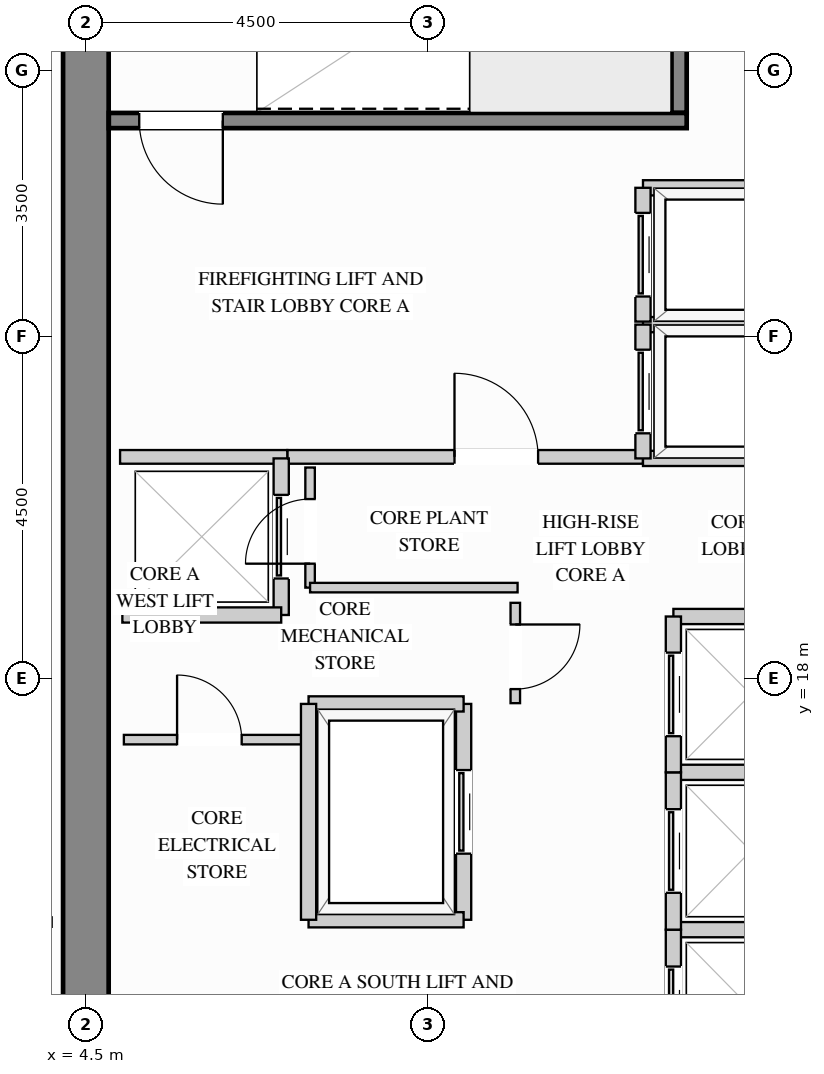
"""IFC4 building model, lengths in metres.
Left out: names, types, materials, properties, quantities, classifications, styles, units other than length and angle.
Written with IfcOpenShell. Run it as: python <this file> out.ifc"""

import sys

from ifc_helpers import new_model, si_unit, direction, frame, frame_2d, origin, place, context, subcontext, project, spatial, rectangle, extrude, source, transform, mapped, element, fill, save


model = new_model("IFC4")
c1 = context("Model", 3, precision=1e-05, world=origin(), true_north=direction((0.0, 1.0)))
c2 = subcontext(c1, "Body", "Model", "MODEL_VIEW")
j1 = project(units=[si_unit("LENGTHUNIT", "METRE"), si_unit("PLANEANGLEUNIT", "RADIAN")], contexts=[c1])
p1 = place(None, origin())
s1 = spatial("IfcSite", under=j1, at=p1, CompositionType="ELEMENT")
p2 = place(p1, origin())
s2 = spatial("IfcBuilding", under=s1, at=p2, CompositionType="ELEMENT")
p3 = place(p2, frame((0.0, 0.0, 164.7)))
s3 = spatial("IfcBuildingStorey", under=s2, at=p3, CompositionType="ELEMENT", Elevation=164.7)
m1 = source(origin(), c2, "Body", "SweptSolid", [
    extrude(rectangle(XDim=20.4, YDim=0.6, at=frame_2d((10.2, 0.0))), origin(), (0.0, 0.0, 1.0), 3.4),
])
p4 = place(p3, frame((4.5, 8.8, 0.0), z_axis=(0.0, 0.0, 1.0), x_axis=(0.0, 1.0, 0.0)))
e1 = element("IfcWall", 1, at=p4, inside=s3, PredefinedType="SHEAR", context=c2, shape_type="MappedRepresentation", body=[
    mapped(m1, transform((0.0, 0.0, 0.0), x_axis=(1.0, 0.0, 0.0), y_axis=(0.0, 1.0, 0.0), z_axis=(0.0, 0.0, 1.0))),
])
p5 = place(p3, frame((7.15, 20.92, 0.0), z_axis=(0.0, 0.0, 1.0), x_axis=(1.0, 0.0, 0.0)))
e2 = element("IfcWall", 2, at=p5, inside=s3, PredefinedType="PARTITIONING", context=c2, shape_type="SweptSolid", body=[
    extrude(rectangle(XDim=4.68, YDim=0.18, at=frame_2d((2.34, 0.0))), origin(), (0.0, 0.0, 1.0), 3.385),
])
p6 = place(p5, frame((2.2, 0.0, 0.0)))
e3 = element("IfcOpeningElement", 3, at=p6, cuts=e2, PredefinedType="OPENING", context=c2, shape_type="SweptSolid", body=[
    extrude(rectangle(XDim=1.1, YDim=2.15, at=frame_2d((0.55, 1.075))), frame((0.0, 0.1, 0.0), z_axis=(0.0, -1.0, 0.0), x_axis=(1.0, 0.0, 0.0)), (0.0, 0.0, 1.0), 0.2),
])
m2 = source(origin(), c2, "Body", "SweptSolid", [
    extrude(rectangle(XDim=2.2, YDim=0.18, at=frame_2d((1.1, 0.0))), origin(), (0.0, 0.0, 1.0), 3.385),
])
p7 = place(p3, frame((4.95, 20.92, 0.0), z_axis=(0.0, 0.0, 1.0), x_axis=(1.0, 0.0, 0.0)))
e4 = element("IfcWall", 4, at=p7, inside=s3, PredefinedType="PARTITIONING", context=c2, shape_type="MappedRepresentation", body=[
    mapped(m2, transform((0.0, 0.0, 0.0), x_axis=(1.0, 0.0, 0.0), y_axis=(0.0, 1.0, 0.0), z_axis=(0.0, 0.0, 1.0))),
])
p8 = place(p3, frame((10.15, 17.68, 0.0), z_axis=(0.0, 0.0, 1.0), x_axis=(0.0, 1.0, 0.0)))
e5 = element("IfcWall", 5, at=p8, inside=s3, PredefinedType="PARTITIONING", context=c2, shape_type="SweptSolid", body=[
    extrude(rectangle(XDim=1.32, YDim=0.125, at=frame_2d((0.66, 0.0))), origin(), (0.0, 0.0, 1.0), 3.385),
])
p9 = place(p8, frame((0.185, 0.0, 0.0)))
e6 = element("IfcOpeningElement", 6, at=p9, cuts=e5, PredefinedType="OPENING", context=c2, shape_type="SweptSolid", body=[
    extrude(rectangle(XDim=0.85, YDim=2.1, at=frame_2d((0.425, 1.05))), frame((0.0, 0.073, 0.0), z_axis=(0.0, -1.0, 0.0), x_axis=(1.0, 0.0, 0.0)), (0.0, 0.0, 1.0), 0.145),
])
p10 = place(p3, frame((7.45, 19.2, 0.0), z_axis=(0.0, 0.0, 1.0), x_axis=(0.0, 1.0, 0.0)))
e7 = element("IfcWall", 7, at=p10, inside=s3, PredefinedType="PARTITIONING", context=c2, shape_type="SweptSolid", body=[
    extrude(rectangle(XDim=1.58, YDim=0.125, at=frame_2d((0.79, 0.0))), origin(), (0.0, 0.0, 1.0), 3.385),
])
p11 = place(p10, frame((0.315, 0.0, 0.0)))
e8 = element("IfcOpeningElement", 8, at=p11, cuts=e7, PredefinedType="OPENING", context=c2, shape_type="SweptSolid", body=[
    extrude(rectangle(XDim=0.85, YDim=2.1, at=frame_2d((0.425, 1.05))), frame((0.0, 0.073, 0.0), z_axis=(0.0, -1.0, 0.0), x_axis=(1.0, 0.0, 0.0)), (0.0, 0.0, 1.0), 0.145),
])
m3 = source(origin(), c2, "Body", "SweptSolid", [
    extrude(rectangle(XDim=2.73, YDim=0.125, at=frame_2d((1.365, 0.0))), origin(), (0.0, 0.0, 1.0), 3.385),
])
p12 = place(p3, frame((7.45, 19.2, 0.0), z_axis=(0.0, 0.0, 1.0), x_axis=(1.0, 0.0, 0.0)))
e9 = element("IfcWall", 9, at=p12, inside=s3, PredefinedType="PARTITIONING", context=c2, shape_type="MappedRepresentation", body=[
    mapped(m3, transform((0.0, 0.0, 0.0), x_axis=(1.0, 0.0, 0.0), y_axis=(0.0, 1.0, 0.0), z_axis=(0.0, 0.0, 1.0))),
])
p13 = place(p3, frame((5.0, 17.2, 0.0), z_axis=(0.0, 0.0, 1.0), x_axis=(1.0, 0.0, 0.0)))
e10 = element("IfcWall", 10, at=p13, inside=s3, PredefinedType="PARTITIONING", context=c2, shape_type="SweptSolid", body=[
    extrude(rectangle(XDim=2.4, YDim=0.125, at=frame_2d((1.2, 0.0))), origin(), (0.0, 0.0, 1.0), 3.385),
])
p14 = place(p13, frame((0.7, 0.0, 0.0)))
e11 = element("IfcOpeningElement", 11, at=p14, cuts=e10, PredefinedType="OPENING", context=c2, shape_type="SweptSolid", body=[
    extrude(rectangle(XDim=0.85, YDim=2.1, at=frame_2d((0.425, 1.05))), frame((0.0, 0.073, 0.0), z_axis=(0.0, -1.0, 0.0), x_axis=(1.0, 0.0, 0.0)), (0.0, 0.0, 1.0), 0.145),
])
m4 = source(origin(), c2, "Body", "SweptSolid", [
    extrude(rectangle(XDim=3.698, YDim=0.125, at=frame_2d((1.849, 0.0))), origin(), (0.0, 0.0, 1.0), 3.385),
])
p15 = place(p3, frame((0.352, 14.8, 0.0), z_axis=(0.0, 0.0, 1.0), x_axis=(1.0, 0.0, 0.0)))
e12 = element("IfcWall", 12, at=p15, inside=s3, PredefinedType="PARTITIONING", context=c2, shape_type="MappedRepresentation", body=[
    mapped(m4, transform((0.0, 0.0, 0.0), x_axis=(1.0, 0.0, 0.0), y_axis=(0.0, 1.0, 0.0), z_axis=(0.0, 0.0, 1.0))),
])
m5 = source(origin(), c2, "Body", "SweptSolid", [
    extrude(rectangle(XDim=2.34, YDim=0.2, at=frame_2d((1.17, 0.0))), origin(), (0.0, 0.0, 1.0), 3.385),
])
for number, where, z_axis, x_axis in (
    (13, (11.83, 22.66, 0.0), (0.0, 0.0, 1.0), (1.0, 0.0, 0.0)),
    (14, (11.83, 20.9, 0.0), (0.0, 0.0, 1.0), (1.0, 0.0, 0.0)),
):
    element("IfcWall", number, at=place(p3, frame(where, z_axis=z_axis, x_axis=x_axis)), inside=s3, PredefinedType="PARTITIONING", context=c2, shape_type="MappedRepresentation", body=[
        mapped(m5, transform((0.0, 0.0, 0.0), x_axis=(1.0, 0.0, 0.0), y_axis=(0.0, 1.0, 0.0), z_axis=(0.0, 0.0, 1.0))),
    ])
p16 = place(p3, frame((11.83, 20.9, 0.0), z_axis=(0.0, 0.0, 1.0), x_axis=(0.0, 1.0, 0.0)))
e15 = element("IfcWall", 15, at=p16, inside=s3, PredefinedType="PARTITIONING", context=c2, shape_type="SweptSolid", body=[
    extrude(rectangle(XDim=1.76, YDim=0.2, at=frame_2d((0.88, 0.0))), origin(), (0.0, 0.0, 1.0), 3.385),
])
p17 = place(p16, frame((0.33, 0.0, 0.0)))
e16 = element("IfcOpeningElement", 16, at=p17, cuts=e15, PredefinedType="OPENING", context=c2, shape_type="SweptSolid", body=[
    extrude(rectangle(XDim=1.1, YDim=2.2, at=frame_2d((0.55, 1.1))), frame((0.0, 0.11, 0.0), z_axis=(0.0, -1.0, 0.0), x_axis=(1.0, 0.0, 0.0)), (0.0, 0.0, 1.0), 0.22),
])
p18 = place(p3, frame((11.83, 24.46, 0.0), z_axis=(0.0, 0.0, 1.0), x_axis=(1.0, 0.0, 0.0)))
e17 = element("IfcWall", 17, at=p18, inside=s3, PredefinedType="PARTITIONING", context=c2, shape_type="MappedRepresentation", body=[
    mapped(m5, transform((0.0, 0.0, 0.0), x_axis=(1.0, 0.0, 0.0), y_axis=(0.0, 1.0, 0.0), z_axis=(0.0, 0.0, 1.0))),
])
p19 = place(p3, frame((11.83, 22.7, 0.0), z_axis=(0.0, 0.0, 1.0), x_axis=(0.0, 1.0, 0.0)))
e18 = element("IfcWall", 18, at=p19, inside=s3, PredefinedType="PARTITIONING", context=c2, shape_type="SweptSolid", body=[
    extrude(rectangle(XDim=1.76, YDim=0.2, at=frame_2d((0.88, 0.0))), origin(), (0.0, 0.0, 1.0), 3.385),
])
p20 = place(p19, frame((0.33, 0.0, 0.0)))
e19 = element("IfcOpeningElement", 19, at=p20, cuts=e18, PredefinedType="OPENING", context=c2, shape_type="SweptSolid", body=[
    extrude(rectangle(XDim=1.1, YDim=2.2, at=frame_2d((0.55, 1.1))), frame((0.0, 0.11, 0.0), z_axis=(0.0, -1.0, 0.0), x_axis=(1.0, 0.0, 0.0)), (0.0, 0.0, 1.0), 0.22),
])
m6 = source(origin(), c2, "Body", "SweptSolid", [
    extrude(rectangle(XDim=1.94, YDim=0.2, at=frame_2d((0.97, 0.0))), origin(), (0.0, 0.0, 1.0), 3.385),
])
p21 = place(p3, frame((12.23, 14.7, 0.0), z_axis=(0.0, 0.0, 1.0), x_axis=(1.0, 0.0, 0.0)))
e20 = element("IfcWall", 20, at=p21, inside=s3, PredefinedType="PARTITIONING", context=c2, shape_type="MappedRepresentation", body=[
    mapped(m6, transform((0.0, 0.0, 0.0), x_axis=(1.0, 0.0, 0.0), y_axis=(0.0, 1.0, 0.0), z_axis=(0.0, 0.0, 1.0))),
])
p22 = place(p3, frame((12.23, 12.63, 0.0), z_axis=(0.0, 0.0, 1.0), x_axis=(0.0, 1.0, 0.0)))
e21 = element("IfcWall", 21, at=p22, inside=s3, PredefinedType="PARTITIONING", context=c2, shape_type="SweptSolid", body=[
    extrude(rectangle(XDim=2.07, YDim=0.2, at=frame_2d((1.035, 0.0))), origin(), (0.0, 0.0, 1.0), 3.385),
])
p23 = place(p22, frame((0.485, 0.0, 0.0)))
e22 = element("IfcOpeningElement", 22, at=p23, cuts=e21, PredefinedType="OPENING", context=c2, shape_type="SweptSolid", body=[
    extrude(rectangle(XDim=1.1, YDim=2.2, at=frame_2d((0.55, 1.1))), frame((0.0, 0.11, 0.0), z_axis=(0.0, -1.0, 0.0), x_axis=(1.0, 0.0, 0.0)), (0.0, 0.0, 1.0), 0.22),
])
p24 = place(p3, frame((12.23, 16.77, 0.0), z_axis=(0.0, 0.0, 1.0), x_axis=(1.0, 0.0, 0.0)))
e23 = element("IfcWall", 23, at=p24, inside=s3, PredefinedType="PARTITIONING", context=c2, shape_type="MappedRepresentation", body=[
    mapped(m6, transform((0.0, 0.0, 0.0), x_axis=(1.0, 0.0, 0.0), y_axis=(0.0, 1.0, 0.0), z_axis=(0.0, 0.0, 1.0))),
])
p25 = place(p3, frame((12.23, 14.7, 0.0), z_axis=(0.0, 0.0, 1.0), x_axis=(0.0, 1.0, 0.0)))
e24 = element("IfcWall", 24, at=p25, inside=s3, PredefinedType="PARTITIONING", context=c2, shape_type="SweptSolid", body=[
    extrude(rectangle(XDim=2.07, YDim=0.2, at=frame_2d((1.035, 0.0))), origin(), (0.0, 0.0, 1.0), 3.385),
])
p26 = place(p25, frame((0.485, 0.0, 0.0)))
e25 = element("IfcOpeningElement", 25, at=p26, cuts=e24, PredefinedType="OPENING", context=c2, shape_type="SweptSolid", body=[
    extrude(rectangle(XDim=1.1, YDim=2.2, at=frame_2d((0.55, 1.1))), frame((0.0, 0.11, 0.0), z_axis=(0.0, -1.0, 0.0), x_axis=(1.0, 0.0, 0.0)), (0.0, 0.0, 1.0), 0.22),
])
p27 = place(p3, frame((12.23, 18.82, 0.0), z_axis=(0.0, 0.0, 1.0), x_axis=(1.0, 0.0, 0.0)))
e26 = element("IfcWall", 26, at=p27, inside=s3, PredefinedType="PARTITIONING", context=c2, shape_type="MappedRepresentation", body=[
    mapped(m6, transform((0.0, 0.0, 0.0), x_axis=(1.0, 0.0, 0.0), y_axis=(0.0, 1.0, 0.0), z_axis=(0.0, 0.0, 1.0))),
])
p28 = place(p3, frame((12.23, 16.77, 0.0), z_axis=(0.0, 0.0, 1.0), x_axis=(0.0, 1.0, 0.0)))
e27 = element("IfcWall", 27, at=p28, inside=s3, PredefinedType="PARTITIONING", context=c2, shape_type="SweptSolid", body=[
    extrude(rectangle(XDim=2.05, YDim=0.2, at=frame_2d((1.025, 0.0))), origin(), (0.0, 0.0, 1.0), 3.385),
])
p29 = place(p28, frame((0.475, 0.0, 0.0)))
e28 = element("IfcOpeningElement", 28, at=p29, cuts=e27, PredefinedType="OPENING", context=c2, shape_type="SweptSolid", body=[
    extrude(rectangle(XDim=1.1, YDim=2.2, at=frame_2d((0.55, 1.1))), frame((0.0, 0.11, 0.0), z_axis=(0.0, -1.0, 0.0), x_axis=(1.0, 0.0, 0.0)), (0.0, 0.0, 1.0), 0.22),
])
p30 = place(p3, frame((7.07, 18.84, 0.0), z_axis=(0.0, 0.0, 1.0), x_axis=(0.0, 1.0, 0.0)))
e29 = element("IfcWall", 29, at=p30, inside=s3, PredefinedType="PARTITIONING", context=c2, shape_type="SweptSolid", body=[
    extrude(rectangle(XDim=2.06, YDim=0.2, at=frame_2d((1.03, 0.0))), origin(), (0.0, 0.0, 1.0), 3.385),
])
p31 = place(p30, frame((0.48, 0.0, 0.0)))
e30 = element("IfcOpeningElement", 30, at=p31, cuts=e29, PredefinedType="OPENING", context=c2, shape_type="SweptSolid", body=[
    extrude(rectangle(XDim=1.1, YDim=2.2, at=frame_2d((0.55, 1.1))), frame((0.0, 0.11, 0.0), z_axis=(0.0, -1.0, 0.0), x_axis=(1.0, 0.0, 0.0)), (0.0, 0.0, 1.0), 0.22),
])
m7 = source(origin(), c2, "Body", "SweptSolid", [
    extrude(rectangle(XDim=2.09, YDim=0.2, at=frame_2d((1.045, 0.0))), origin(), (0.0, 0.0, 1.0), 3.385),
])
p32 = place(p3, frame((4.98, 18.84, 0.0), z_axis=(0.0, 0.0, 1.0), x_axis=(1.0, 0.0, 0.0)))
e31 = element("IfcWall", 31, at=p32, inside=s3, PredefinedType="PARTITIONING", context=c2, shape_type="MappedRepresentation", body=[
    mapped(m7, transform((0.0, 0.0, 0.0), x_axis=(1.0, 0.0, 0.0), y_axis=(0.0, 1.0, 0.0), z_axis=(0.0, 0.0, 1.0))),
])
p33 = place(p3, frame((9.47, 14.83, 0.0), z_axis=(0.0, 0.0, 1.0), x_axis=(0.0, 1.0, 0.0)))
e32 = element("IfcWall", 32, at=p33, inside=s3, PredefinedType="PARTITIONING", context=c2, shape_type="SweptSolid", body=[
    extrude(rectangle(XDim=2.84, YDim=0.2, at=frame_2d((1.42, 0.0))), origin(), (0.0, 0.0, 1.0), 3.385),
])
p34 = place(p33, frame((0.87, 0.0, 0.0)))
e33 = element("IfcOpeningElement", 33, at=p34, cuts=e32, PredefinedType="OPENING", context=c2, shape_type="SweptSolid", body=[
    extrude(rectangle(XDim=1.1, YDim=2.2, at=frame_2d((0.55, 1.1))), frame((0.0, 0.11, 0.0), z_axis=(0.0, -1.0, 0.0), x_axis=(1.0, 0.0, 0.0)), (0.0, 0.0, 1.0), 0.22),
])
m8 = source(origin(), c2, "Body", "SweptSolid", [
    extrude(rectangle(XDim=2.04, YDim=0.2, at=frame_2d((1.02, 0.0))), origin(), (0.0, 0.0, 1.0), 3.385),
])
for number, where, z_axis, x_axis in (
    (34, (7.43, 17.67, 0.0), (0.0, 0.0, 1.0), (1.0, 0.0, 0.0)),
    (35, (7.43, 14.83, 0.0), (0.0, 0.0, 1.0), (1.0, 0.0, 0.0)),
):
    element("IfcWall", number, at=place(p3, frame(where, z_axis=z_axis, x_axis=x_axis)), inside=s3, PredefinedType="PARTITIONING", context=c2, shape_type="MappedRepresentation", body=[
        mapped(m8, transform((0.0, 0.0, 0.0), x_axis=(1.0, 0.0, 0.0), y_axis=(0.0, 1.0, 0.0), z_axis=(0.0, 0.0, 1.0))),
    ])
m9 = source(origin(), c2, "Body", "SweptSolid", [
    extrude(rectangle(XDim=2.84, YDim=0.2, at=frame_2d((1.42, 0.0))), origin(), (0.0, 0.0, 1.0), 3.385),
])
p35 = place(p3, frame((7.43, 14.83, 0.0), z_axis=(0.0, 0.0, 1.0), x_axis=(0.0, 1.0, 0.0)))
e36 = element("IfcWall", 36, at=p35, inside=s3, PredefinedType="PARTITIONING", context=c2, shape_type="MappedRepresentation", body=[
    mapped(m9, transform((0.0, 0.0, 0.0), x_axis=(1.0, 0.0, 0.0), y_axis=(0.0, 1.0, 0.0), z_axis=(0.0, 0.0, 1.0))),
])
m10 = source(origin(), c2, "Body", "SweptSolid", [
    extrude(rectangle(XDim=3.753, YDim=0.2, at=frame_2d((1.876, 0.0))), origin(), (0.0, 0.0, 1.0), 3.4),
])
p36 = place(p3, frame((12.305, 25.445, 0.0), z_axis=(0.0, 0.0, 1.0), x_axis=(0.0, 1.0, 0.0)))
e37 = element("IfcWall", 37, at=p36, inside=s3, PredefinedType="SHEAR", context=c2, shape_type="MappedRepresentation", body=[
    mapped(m10, transform((0.0, 0.0, 0.0), x_axis=(1.0, 0.0, 0.0), y_axis=(0.0, 1.0, 0.0), z_axis=(0.0, 0.0, 1.0))),
])
p37 = place(p3, frame((4.802, 25.345, 0.0), z_axis=(0.0, 0.0, 1.0), x_axis=(1.0, 0.0, 0.0)))
e38 = element("IfcWall", 38, at=p37, inside=s3, PredefinedType="SHEAR", context=c2, shape_type="SweptSolid", body=[
    extrude(rectangle(XDim=7.603, YDim=0.2, at=frame_2d((3.802, 0.0))), origin(), (0.0, 0.0, 1.0), 3.4),
])
p38 = place(p37, frame((0.4, 0.0, 0.0)))
e39 = element("IfcOpeningElement", 39, at=p38, cuts=e38, PredefinedType="OPENING", context=c2, shape_type="SweptSolid", body=[
    extrude(rectangle(XDim=1.1, YDim=2.15, at=frame_2d((0.55, 1.075))), frame((0.0, 0.11, 0.0), z_axis=(0.0, -1.0, 0.0), x_axis=(1.0, 0.0, 0.0)), (0.0, 0.0, 1.0), 0.22),
])
m11 = source(origin(), c2, "Body", "SweptSolid", [
    extrude(rectangle(XDim=1.1, YDim=2.15, at=frame_2d((0.55, 1.075))), frame((0.0, 0.025, 0.0), z_axis=(0.0, -1.0, 0.0), x_axis=(1.0, 0.0, 0.0)), (0.0, 0.0, 1.0), 0.05),
])
p39 = place(p6, origin())
e40 = element("IfcDoor", 40, at=p39, inside=s3, OperationType="SINGLE_SWING_LEFT", PredefinedType="DOOR", context=c2, shape_type="MappedRepresentation", body=[
    mapped(m11, transform((0.0, 0.0, 0.0), x_axis=(1.0, 0.0, 0.0), y_axis=(0.0, 1.0, 0.0), z_axis=(0.0, 0.0, 1.0))),
])
fill(e3, e40)
m12 = source(origin(), c2, "Body", "SweptSolid", [
    extrude(rectangle(XDim=1.1, YDim=2.2, at=frame_2d((0.55, 1.1))), frame((0.0, 0.025, 0.0), z_axis=(0.0, -1.0, 0.0), x_axis=(1.0, 0.0, 0.0)), (0.0, 0.0, 1.0), 0.05),
])
p40 = place(p17, origin())
e41 = element("IfcDoor", 41, at=p40, inside=s3, OperationType="SLIDING_TO_LEFT", PredefinedType="DOOR", context=c2, shape_type="MappedRepresentation", body=[
    mapped(m12, transform((0.0, 0.0, 0.0), x_axis=(1.0, 0.0, 0.0), y_axis=(0.0, 1.0, 0.0), z_axis=(0.0, 0.0, 1.0))),
])
fill(e16, e41)
p41 = place(p20, origin())
e42 = element("IfcDoor", 42, at=p41, inside=s3, OperationType="SLIDING_TO_LEFT", PredefinedType="DOOR", context=c2, shape_type="MappedRepresentation", body=[
    mapped(m12, transform((0.0, 0.0, 0.0), x_axis=(1.0, 0.0, 0.0), y_axis=(0.0, 1.0, 0.0), z_axis=(0.0, 0.0, 1.0))),
])
fill(e19, e42)
p42 = place(p23, origin())
e43 = element("IfcDoor", 43, at=p42, inside=s3, OperationType="SLIDING_TO_LEFT", PredefinedType="DOOR", context=c2, shape_type="MappedRepresentation", body=[
    mapped(m12, transform((0.0, 0.0, 0.0), x_axis=(1.0, 0.0, 0.0), y_axis=(0.0, 1.0, 0.0), z_axis=(0.0, 0.0, 1.0))),
])
fill(e22, e43)
p43 = place(p26, origin())
e44 = element("IfcDoor", 44, at=p43, inside=s3, OperationType="SLIDING_TO_LEFT", PredefinedType="DOOR", context=c2, shape_type="MappedRepresentation", body=[
    mapped(m12, transform((0.0, 0.0, 0.0), x_axis=(1.0, 0.0, 0.0), y_axis=(0.0, 1.0, 0.0), z_axis=(0.0, 0.0, 1.0))),
])
fill(e25, e44)
p44 = place(p29, origin())
e45 = element("IfcDoor", 45, at=p44, inside=s3, OperationType="SLIDING_TO_LEFT", PredefinedType="DOOR", context=c2, shape_type="MappedRepresentation", body=[
    mapped(m12, transform((0.0, 0.0, 0.0), x_axis=(1.0, 0.0, 0.0), y_axis=(0.0, 1.0, 0.0), z_axis=(0.0, 0.0, 1.0))),
])
fill(e28, e45)
p45 = place(p31, origin())
e46 = element("IfcDoor", 46, at=p45, inside=s3, OperationType="SLIDING_TO_LEFT", PredefinedType="DOOR", context=c2, shape_type="MappedRepresentation", body=[
    mapped(m12, transform((0.0, 0.0, 0.0), x_axis=(1.0, 0.0, 0.0), y_axis=(0.0, 1.0, 0.0), z_axis=(0.0, 0.0, 1.0))),
])
fill(e30, e46)
p46 = place(p34, origin())
e47 = element("IfcDoor", 47, at=p46, inside=s3, OperationType="SLIDING_TO_LEFT", PredefinedType="DOOR", context=c2, shape_type="MappedRepresentation", body=[
    mapped(m12, transform((0.0, 0.0, 0.0), x_axis=(1.0, 0.0, 0.0), y_axis=(0.0, 1.0, 0.0), z_axis=(0.0, 0.0, 1.0))),
])
fill(e33, e47)
m13 = source(origin(), c2, "Body", "SweptSolid", [
    extrude(rectangle(XDim=0.85, YDim=2.1, at=frame_2d((0.425, 1.05))), frame((0.0, 0.025, 0.0), z_axis=(0.0, -1.0, 0.0), x_axis=(1.0, 0.0, 0.0)), (0.0, 0.0, 1.0), 0.05),
])
p47 = place(p9, origin())
e48 = element("IfcDoor", 48, at=p47, inside=s3, OperationType="SINGLE_SWING_RIGHT", PredefinedType="DOOR", context=c2, shape_type="MappedRepresentation", body=[
    mapped(m13, transform((0.0, 0.0, 0.0), x_axis=(1.0, 0.0, 0.0), y_axis=(0.0, 1.0, 0.0), z_axis=(0.0, 0.0, 1.0))),
])
fill(e6, e48)
p48 = place(p14, origin())
e49 = element("IfcDoor", 49, at=p48, inside=s3, OperationType="SINGLE_SWING_LEFT", PredefinedType="DOOR", context=c2, shape_type="MappedRepresentation", body=[
    mapped(m13, transform((0.0, 0.0, 0.0), x_axis=(1.0, 0.0, 0.0), y_axis=(0.0, 1.0, 0.0), z_axis=(0.0, 0.0, 1.0))),
])
fill(e11, e49)
p49 = place(p11, origin())
e50 = element("IfcDoor", 50, at=p49, inside=s3, OperationType="SINGLE_SWING_LEFT", PredefinedType="DOOR", context=c2, shape_type="MappedRepresentation", body=[
    mapped(m13, transform((0.0, 0.0, 0.0), x_axis=(1.0, 0.0, 0.0), y_axis=(0.0, 1.0, 0.0), z_axis=(0.0, 0.0, 1.0))),
])
fill(e8, e50)
m14 = source(origin(), c2, "Body", "SweptSolid", [
    extrude(rectangle(XDim=1.1, YDim=2.15, at=frame_2d((0.55, 1.075))), frame((0.0, 0.025, 0.0), z_axis=(0.0, -1.0, 0.0), x_axis=(1.0, 0.0, 0.0)), (0.0, 0.0, 1.0), 0.05),
])
p50 = place(p38, origin())
e51 = element("IfcDoor", 51, at=p50, inside=s3, OperationType="SINGLE_SWING_RIGHT", PredefinedType="DOOR", context=c2, shape_type="MappedRepresentation", body=[
    mapped(m14, transform((0.0, 0.0, 0.0), x_axis=(1.0, 0.0, 0.0), y_axis=(0.0, 1.0, 0.0), z_axis=(0.0, 0.0, 1.0))),
])
fill(e39, e51)
save(model, sys.argv[1])
